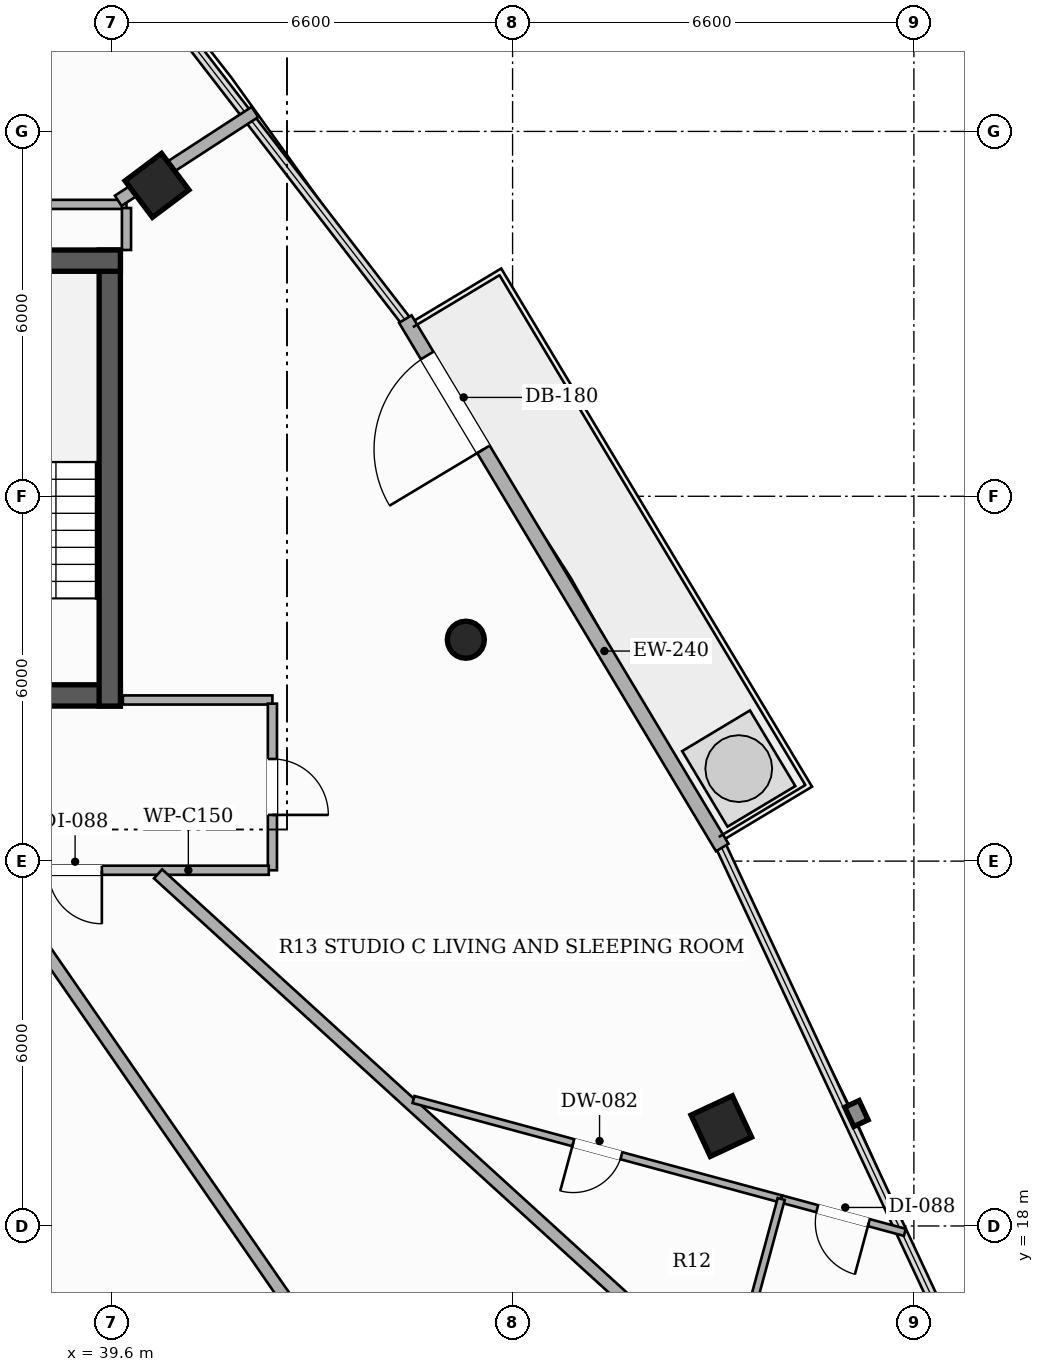
"""IFC4 building model, lengths in metres.
Left out: names, types, materials, properties, quantities, classifications, styles, units other than length and angle.
Written with IfcOpenShell. Run it as: python <this file> out.ifc"""

import sys

from ifc_helpers import new_model, si_unit, direction, frame, frame_2d, origin, origin_2d, place, context, subcontext, project, spatial, rectangle, hollow_rectangle, hollow_circle, extrude, element, fill, save


model = new_model("IFC4")
c1 = context("Model", 3, precision=1e-05, world=origin(), true_north=direction((0.0, 1.0)))
c2 = subcontext(c1, "Body", "Model", "MODEL_VIEW")
j1 = project(units=[si_unit("LENGTHUNIT", "METRE"), si_unit("PLANEANGLEUNIT", "RADIAN")], contexts=[c1])
p1 = place(None, origin())
s1 = spatial("IfcSite", under=j1, at=p1, CompositionType="ELEMENT")
p2 = place(p1, origin())
s2 = spatial("IfcBuilding", under=s1, at=p2, CompositionType="ELEMENT")
p3 = place(p2, frame((0.0, 0.0, 229.4)))
s3 = spatial("IfcBuildingStorey", under=s2, at=p3, CompositionType="ELEMENT", Elevation=229.4)
p4 = place(p3, frame((26.25, 26.725, 0.0), z_axis=(0.0, 0.0, 1.0), x_axis=(1.0, 0.0, 0.0)))
e1 = element("IfcWall", 1, at=p4, inside=s3, PredefinedType="SHEAR", context=c2, shape_type="SweptSolid", body=[
    extrude(rectangle(XDim=13.5, YDim=0.35, at=frame_2d((6.75, 0.0))), origin(), (0.0, 0.0, 1.0), 3.3),
])
p5 = place(p4, frame((4.35, 0.0, 0.0)))
e2 = element("IfcOpeningElement", 2, at=p5, cuts=e1, PredefinedType="OPENING", context=c2, shape_type="SweptSolid", body=[
    extrude(rectangle(XDim=1.05, YDim=2.15, at=frame_2d((0.525, 1.075))), frame((0.0, 0.185, 0.0), z_axis=(0.0, -1.0, 0.0), x_axis=(1.0, 0.0, 0.0)), (0.0, 0.0, 1.0), 0.37),
])
p6 = place(p4, frame((8.3, 0.0, 0.0)))
e3 = element("IfcOpeningElement", 3, at=p6, cuts=e1, PredefinedType="OPENING", context=c2, shape_type="SweptSolid", body=[
    extrude(rectangle(XDim=1.05, YDim=2.15, at=frame_2d((0.525, 1.075))), frame((0.0, 0.185, 0.0), z_axis=(0.0, -1.0, 0.0), x_axis=(1.0, 0.0, 0.0)), (0.0, 0.0, 1.0), 0.37),
])
p7 = place(p3, frame((39.575, 26.55, 0.0), z_axis=(0.0, 0.0, 1.0), x_axis=(0.0, 1.0, 0.0)))
e4 = element("IfcWall", 4, at=p7, inside=s3, PredefinedType="SHEAR", context=c2, shape_type="SweptSolid", body=[
    extrude(rectangle(XDim=7.5, YDim=0.35, at=frame_2d((3.75, 0.0))), origin(), (0.0, 0.0, 1.0), 3.3),
])
p8 = place(p3, frame((36.15, 33.875, 0.0), z_axis=(0.0, 0.0, 1.0), x_axis=(1.0, 0.0, 0.0)))
e5 = element("IfcWall", 5, at=p8, inside=s3, PredefinedType="SHEAR", context=c2, shape_type="SweptSolid", body=[
    extrude(rectangle(XDim=3.6, YDim=0.35, at=frame_2d((1.8, 0.0))), origin(), (0.0, 0.0, 1.0), 3.3),
])
p9 = place(p3, frame((49.633, 19.642, 0.0), z_axis=(0.0, 0.0, 1.0), x_axis=(-0.422618261741, 0.906307787037, 0.0)))
e6 = element("IfcColumn", 6, at=p9, inside=s3, PredefinedType="COLUMN", context=c2, shape_type="SweptSolid", body=[
    extrude(hollow_rectangle(XDim=0.75, YDim=0.75, WallThickness=0.025, at=origin_2d()), origin(), (0.0, 0.0, 1.0), 3.3),
])
p10 = place(p3, frame((45.431, 27.641, 0.0), z_axis=(0.0, 0.0, 1.0), x_axis=(1.0, 0.0, 0.0)))
e7 = element("IfcColumn", 7, at=p10, inside=s3, PredefinedType="COLUMN", context=c2, shape_type="SweptSolid", body=[
    extrude(hollow_circle(Radius=0.305, WallThickness=0.016, at=origin_2d()), origin(), (0.0, 0.0, 1.0), 3.3),
])
p11 = place(p3, frame((40.352, 35.113, 0.0), z_axis=(0.0, 0.0, 1.0), x_axis=(-0.600420225326, 0.799684658487, 0.0)))
e8 = element("IfcColumn", 8, at=p11, inside=s3, PredefinedType="COLUMN", context=c2, shape_type="SweptSolid", body=[
    extrude(hollow_rectangle(XDim=0.75, YDim=0.75, WallThickness=0.025, at=origin_2d()), origin(), (0.0, 0.0, 1.0), 3.3),
])
p12 = place(p3, frame((49.648, 24.224, 0.0), z_axis=(0.0, 0.0, 1.0), x_axis=(-0.514346935205, 0.857582200285, 0.0)))
e9 = element("IfcWall", 9, at=p12, inside=s3, PredefinedType="SOLIDWALL", context=c2, shape_type="SweptSolid", body=[
    extrude(rectangle(XDim=10.133, YDim=0.24, at=frame_2d((5.066, 0.0))), origin(), (0.0, 0.0, 1.0), 2.624),
])
p13 = place(p12, frame((7.635, 0.0, 0.0)))
e10 = element("IfcOpeningElement", 10, at=p13, cuts=e9, PredefinedType="OPENING", context=c2, shape_type="SweptSolid", body=[
    extrude(rectangle(XDim=1.8, YDim=2.2, at=frame_2d((0.9, 1.1))), frame((0.0, 0.13, 0.0), z_axis=(0.0, -1.0, 0.0), x_axis=(1.0, 0.0, 0.0)), (0.0, 0.0, 1.0), 0.26),
])
p14 = place(p3, frame((39.79, 26.65, 0.0), z_axis=(0.0, 0.0, 1.0), x_axis=(1.0, 0.0, 0.0)))
e11 = element("IfcWall", 11, at=p14, inside=s3, PredefinedType="PARTITIONING", context=c2, shape_type="SweptSolid", body=[
    extrude(rectangle(XDim=2.46, YDim=0.15, at=frame_2d((1.23, 0.0))), origin(), (0.0, 0.0, 1.0), 2.565),
])
p15 = place(p3, frame((42.25, 26.59, 0.0), z_axis=(0.0, 0.0, 1.0), x_axis=(0.0, -1.0, 0.0)))
e12 = element("IfcWall", 12, at=p15, inside=s3, PredefinedType="PARTITIONING", context=c2, shape_type="SweptSolid", body=[
    extrude(rectangle(XDim=2.74, YDim=0.15, at=frame_2d((1.37, 0.0))), origin(), (0.0, 0.0, 1.0), 2.773),
])
p16 = place(p15, frame((0.91, 0.0, 0.0)))
e13 = element("IfcOpeningElement", 13, at=p16, cuts=e12, PredefinedType="OPENING", context=c2, shape_type="SweptSolid", body=[
    extrude(rectangle(XDim=0.92, YDim=2.15, at=frame_2d((0.46, 1.075))), frame((0.0, 0.085, 0.0), z_axis=(0.0, -1.0, 0.0), x_axis=(1.0, 0.0, 0.0)), (0.0, 0.0, 1.0), 0.17),
])
p17 = place(p3, frame((42.19, 23.85, 0.0), z_axis=(0.0, 0.0, 1.0), x_axis=(-1.0, 0.0, 0.0)))
e14 = element("IfcWall", 14, at=p17, inside=s3, PredefinedType="PARTITIONING", context=c2, shape_type="SweptSolid", body=[
    extrude(rectangle(XDim=8.286, YDim=0.15, at=frame_2d((4.143, 0.0))), origin(), (0.0, 0.0, 1.0), 2.565),
])
p18 = place(p17, frame((5.824, 0.0, 0.0)))
e15 = element("IfcOpeningElement", 15, at=p18, cuts=e14, PredefinedType="OPENING", context=c2, shape_type="SweptSolid", body=[
    extrude(rectangle(XDim=0.88, YDim=2.1, at=frame_2d((0.44, 1.05))), frame((0.0, 0.085, 0.0), z_axis=(0.0, -1.0, 0.0), x_axis=(1.0, 0.0, 0.0)), (0.0, 0.0, 1.0), 0.17),
])
p19 = place(p17, frame((2.745, 0.0, 0.0)))
e16 = element("IfcOpeningElement", 16, at=p19, cuts=e14, PredefinedType="OPENING", context=c2, shape_type="SweptSolid", body=[
    extrude(rectangle(XDim=0.88, YDim=2.1, at=frame_2d((0.44, 1.05))), frame((0.0, 0.085, 0.0), z_axis=(0.0, -1.0, 0.0), x_axis=(1.0, 0.0, 0.0)), (0.0, 0.0, 1.0), 0.17),
])
p20 = place(p3, frame((36.31, 34.8, 0.0), z_axis=(0.0, 0.0, 1.0), x_axis=(1.0, 0.0, 0.0)))
e17 = element("IfcWall", 17, at=p20, inside=s3, PredefinedType="PARTITIONING", context=c2, shape_type="SweptSolid", body=[
    extrude(rectangle(XDim=3.54, YDim=0.15, at=frame_2d((1.77, 0.0))), origin(), (0.0, 0.0, 1.0), 2.425),
])
p21 = place(p3, frame((39.85, 34.74, 0.0), z_axis=(0.0, 0.0, 1.0), x_axis=(0.0, -1.0, 0.0)))
e18 = element("IfcWall", 18, at=p21, inside=s3, PredefinedType="PARTITIONING", context=c2, shape_type="SweptSolid", body=[
    extrude(rectangle(XDim=0.69, YDim=0.15, at=frame_2d((0.345, 0.0))), origin(), (0.0, 0.0, 1.0), 2.773),
])
p22 = place(p3, frame((37.641, 23.79, 0.0), z_axis=(0.0, 0.0, 1.0), x_axis=(0.568876812748, -0.822422745258, 0.0)))
e19 = element("IfcWall", 19, at=p22, inside=s3, PredefinedType="PARTITIONING", context=c2, shape_type="SweptSolid", body=[
    extrude(rectangle(XDim=21.342, YDim=0.2, at=frame_2d((10.671, 0.0))), origin(), (0.0, 0.0, 1.0), 2.492),
])
p23 = place(p3, frame((55.919, 9.631, 0.0), z_axis=(0.0, 0.0, 1.0), x_axis=(-0.739406671307, 0.673259069324, 0.0)))
e20 = element("IfcWall", 20, at=p23, inside=s3, PredefinedType="PARTITIONING", context=c2, shape_type="SweptSolid", body=[
    extrude(rectangle(XDim=21.031, YDim=0.2, at=frame_2d((10.515, 0.0))), origin(), (0.0, 0.0, 1.0), 2.492),
])
p24 = place(p3, frame((39.714, 34.86, 0.0), z_axis=(0.0, 0.0, 1.0), x_axis=(0.838740992226, 0.54453057578, 0.0)))
e21 = element("IfcWall", 21, at=p24, inside=s3, PredefinedType="PARTITIONING", context=c2, shape_type="SweptSolid", body=[
    extrude(rectangle(XDim=2.681, YDim=0.2, at=frame_2d((1.341, 0.0))), origin(), (0.0, 0.0, 1.0), 2.492),
])
p25 = place(p3, frame((50.618, 18.444, 0.0), z_axis=(0.0, 0.0, 1.0), x_axis=(-0.96530580675, 0.261122001091, 0.0)))
e22 = element("IfcWall", 22, at=p25, inside=s3, PredefinedType="PARTITIONING", context=c2, shape_type="SweptSolid", body=[
    extrude(rectangle(XDim=6.265, YDim=0.12, at=frame_2d((3.133, 0.0))), origin(), (0.0, 0.0, 1.0), 2.492),
])
p26 = place(p25, frame((2.723, 0.0, 0.0)))
e23 = element("IfcOpeningElement", 23, at=p26, cuts=e22, PredefinedType="OPENING", context=c2, shape_type="SweptSolid", body=[
    extrude(rectangle(XDim=0.82, YDim=2.1, at=frame_2d((0.41, 1.05))), frame((0.0, 0.07, 0.0), z_axis=(0.0, -1.0, 0.0), x_axis=(1.0, 0.0, 0.0)), (0.0, 0.0, 1.0), 0.14),
])
p27 = place(p3, frame((52.651, 17.895, 0.0), z_axis=(0.0, 0.0, 1.0), x_axis=(-0.96540836449, 0.260742573765, 0.0)))
e24 = element("IfcWall", 24, at=p27, inside=s3, PredefinedType="PARTITIONING", context=c2, shape_type="SweptSolid", body=[
    extrude(rectangle(XDim=2.106, YDim=0.12, at=frame_2d((1.053, 0.0))), origin(), (0.0, 0.0, 1.0), 2.619),
])
p28 = place(p27, frame((0.613, 0.0, 0.0)))
e25 = element("IfcOpeningElement", 25, at=p28, cuts=e24, PredefinedType="OPENING", context=c2, shape_type="SweptSolid", body=[
    extrude(rectangle(XDim=0.88, YDim=2.1, at=frame_2d((0.44, 1.05))), frame((0.0, 0.07, 0.0), z_axis=(0.0, -1.0, 0.0), x_axis=(1.0, 0.0, 0.0)), (0.0, 0.0, 1.0), 0.14),
])
p29 = place(p3, frame((50.618, 18.444, 0.0), z_axis=(0.0, 0.0, 1.0), x_axis=(-0.260928129887, -0.965358229381, 0.0)))
e26 = element("IfcWall", 26, at=p29, inside=s3, PredefinedType="PARTITIONING", context=c2, shape_type="SweptSolid", body=[
    extrude(rectangle(XDim=3.219, YDim=0.12, at=frame_2d((1.609, 0.0))), origin(), (0.0, 0.0, 1.0), 2.492),
])
p30 = place(p13, origin())
e27 = element("IfcDoor", 27, at=p30, inside=s3, OperationType="SINGLE_SWING_LEFT", PredefinedType="DOOR", context=c2, shape_type="SweptSolid", body=[
    extrude(rectangle(XDim=1.8, YDim=2.2, at=frame_2d((0.9, 1.1))), frame((0.0, 0.025, 0.0), z_axis=(0.0, -1.0, 0.0), x_axis=(1.0, 0.0, 0.0)), (0.0, 0.0, 1.0), 0.05),
])
fill(e10, e27)
p31 = place(p16, origin())
e28 = element("IfcDoor", 28, at=p31, inside=s3, OperationType="SINGLE_SWING_RIGHT", PredefinedType="DOOR", context=c2, shape_type="SweptSolid", body=[
    extrude(rectangle(XDim=0.92, YDim=2.15, at=frame_2d((0.46, 1.075))), frame((0.0, 0.025, 0.0), z_axis=(0.0, -1.0, 0.0), x_axis=(1.0, 0.0, 0.0)), (0.0, 0.0, 1.0), 0.05),
])
fill(e13, e28)
p32 = place(p26, origin())
e29 = element("IfcDoor", 29, at=p32, inside=s3, OperationType="SINGLE_SWING_RIGHT", PredefinedType="DOOR", context=c2, shape_type="SweptSolid", body=[
    extrude(rectangle(XDim=0.82, YDim=2.1, at=frame_2d((0.41, 1.05))), frame((0.0, 0.025, 0.0), z_axis=(0.0, -1.0, 0.0), x_axis=(1.0, 0.0, 0.0)), (0.0, 0.0, 1.0), 0.05),
])
fill(e23, e29)
p33 = place(p28, origin())
e30 = element("IfcDoor", 30, at=p33, inside=s3, OperationType="SINGLE_SWING_LEFT", PredefinedType="DOOR", context=c2, shape_type="SweptSolid", body=[
    extrude(rectangle(XDim=0.88, YDim=2.1, at=frame_2d((0.44, 1.05))), frame((0.0, 0.025, 0.0), z_axis=(0.0, -1.0, 0.0), x_axis=(1.0, 0.0, 0.0)), (0.0, 0.0, 1.0), 0.05),
])
fill(e25, e30)
p34 = place(p19, origin())
e31 = element("IfcDoor", 31, at=p34, inside=s3, OperationType="SINGLE_SWING_LEFT", PredefinedType="DOOR", context=c2, shape_type="SweptSolid", body=[
    extrude(rectangle(XDim=0.88, YDim=2.1, at=frame_2d((0.44, 1.05))), frame((0.0, 0.025, 0.0), z_axis=(0.0, -1.0, 0.0), x_axis=(1.0, 0.0, 0.0)), (0.0, 0.0, 1.0), 0.05),
])
fill(e16, e31)
save(model, sys.argv[1])
